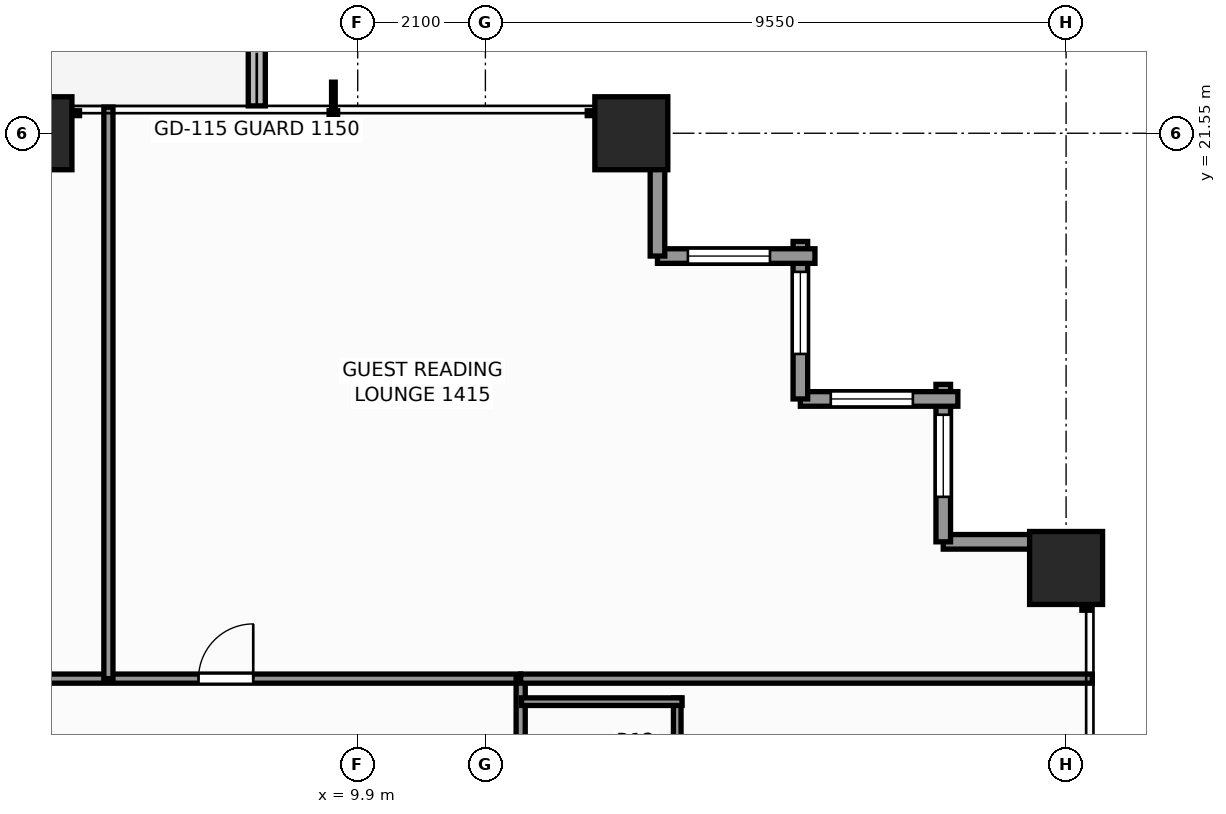
"""IFC4 building model, lengths in metres.
Left out: names, types, materials, properties, quantities, classifications, styles, units other than length and angle.
Written with IfcOpenShell. Run it as: python <this file> out.ifc"""

import sys

from ifc_helpers import new_model, si_unit, direction, frame, frame_2d, origin, origin_2d, place, context, subcontext, project, spatial, rectangle, extrude, element, fill, save


model = new_model("IFC4")
c1 = context("Model", 3, precision=1e-05, world=origin(), true_north=direction((0.0, 1.0)))
c2 = subcontext(c1, "Body", "Model", "MODEL_VIEW")
j1 = project(units=[si_unit("LENGTHUNIT", "METRE"), si_unit("PLANEANGLEUNIT", "RADIAN")], contexts=[c1])
p1 = place(None, origin())
s1 = spatial("IfcSite", under=j1, at=p1, CompositionType="ELEMENT")
p2 = place(p1, origin())
s2 = spatial("IfcBuilding", under=s1, at=p2, CompositionType="ELEMENT")
p3 = place(p2, frame((0.0, 0.0, 50.2)))
s3 = spatial("IfcBuildingStorey", under=s2, at=p3, CompositionType="ELEMENT", Elevation=50.2)
for number, where, z_axis, x_axis in (
    (1, (4.6, 21.55, 0.0), (0.0, 0.0, 1.0), (1.0, 0.0, 0.0)),
    (2, (14.4, 21.55, 0.0), (0.0, 0.0, 1.0), (1.0, 0.0, 0.0)),
    (3, (21.55, 14.4, 0.0), (0.0, 0.0, 1.0), (1.0, 0.0, 0.0)),
):
    element("IfcColumn", number, at=place(p3, frame(where, z_axis=z_axis, x_axis=x_axis)), inside=s3, PredefinedType="COLUMN", context=c2, shape_type="SweptSolid", body=[
        extrude(rectangle(XDim=1.2, YDim=1.2, at=origin_2d()), origin(), (0.0, 0.0, 1.0), 3.3),
    ])
p4 = place(p3, frame((8.24, 22.0, -0.06), z_axis=(0.0, 0.0, 1.0), x_axis=(0.0, 1.0, 0.0)))
e4 = element("IfcWall", 4, at=p4, inside=s3, PredefinedType="PARAPET", context=c2, shape_type="SweptSolid", body=[
    extrude(rectangle(XDim=1.705, YDim=0.28, at=frame_2d((0.853, 0.0))), origin(), (0.0, 0.0, 1.0), 0.42),
])
p5 = place(p3, frame((19.53, 14.83, 0.0), z_axis=(0.0, 0.0, 1.0), x_axis=(1.0, 0.0, 0.0)))
e5 = element("IfcWall", 5, at=p5, inside=s3, PredefinedType="STANDARD", context=c2, shape_type="SweptSolid", body=[
    extrude(rectangle(XDim=2.59, YDim=0.24, at=frame_2d((1.295, 0.0))), origin(), (0.0, 0.0, 1.0), 2.439),
])
p6 = place(p3, frame((19.53, 17.42, 0.0), z_axis=(0.0, 0.0, 1.0), x_axis=(0.0, -1.0, 0.0)))
e6 = element("IfcWall", 6, at=p6, inside=s3, PredefinedType="STANDARD", context=c2, shape_type="SweptSolid", body=[
    extrude(rectangle(XDim=2.59, YDim=0.24, at=frame_2d((1.295, 0.0))), origin(), (0.0, 0.0, 1.0), 2.439),
])
p7 = place(p6, frame((0.5, 0.0, 0.65)))
e7 = element("IfcOpeningElement", 7, at=p7, cuts=e6, PredefinedType="OPENING", context=c2, shape_type="SweptSolid", body=[
    extrude(rectangle(XDim=1.35, YDim=1.55, at=frame_2d((0.675, 0.775))), frame((0.0, 0.13, 0.0), z_axis=(0.0, -1.0, 0.0), x_axis=(1.0, 0.0, 0.0)), (0.0, 0.0, 1.0), 0.26),
])
p8 = place(p3, frame((17.18, 17.18, 0.0), z_axis=(0.0, 0.0, 1.0), x_axis=(1.0, 0.0, 0.0)))
e8 = element("IfcWall", 8, at=p8, inside=s3, PredefinedType="STANDARD", context=c2, shape_type="SweptSolid", body=[
    extrude(rectangle(XDim=2.59, YDim=0.24, at=frame_2d((1.295, 0.0))), origin(), (0.0, 0.0, 1.0), 2.439),
])
p9 = place(p8, frame((0.5, 0.0, 0.65)))
e9 = element("IfcOpeningElement", 9, at=p9, cuts=e8, PredefinedType="OPENING", context=c2, shape_type="SweptSolid", body=[
    extrude(rectangle(XDim=1.35, YDim=1.55, at=frame_2d((0.675, 0.775))), frame((0.0, 0.13, 0.0), z_axis=(0.0, -1.0, 0.0), x_axis=(1.0, 0.0, 0.0)), (0.0, 0.0, 1.0), 0.26),
])
p10 = place(p3, frame((17.18, 19.77, 0.0), z_axis=(0.0, 0.0, 1.0), x_axis=(0.0, -1.0, 0.0)))
e10 = element("IfcWall", 10, at=p10, inside=s3, PredefinedType="STANDARD", context=c2, shape_type="SweptSolid", body=[
    extrude(rectangle(XDim=2.59, YDim=0.24, at=frame_2d((1.295, 0.0))), origin(), (0.0, 0.0, 1.0), 2.439),
])
p11 = place(p10, frame((0.5, 0.0, 0.65)))
e11 = element("IfcOpeningElement", 11, at=p11, cuts=e10, PredefinedType="OPENING", context=c2, shape_type="SweptSolid", body=[
    extrude(rectangle(XDim=1.35, YDim=1.55, at=frame_2d((0.675, 0.775))), frame((0.0, 0.13, 0.0), z_axis=(0.0, -1.0, 0.0), x_axis=(1.0, 0.0, 0.0)), (0.0, 0.0, 1.0), 0.26),
])
p12 = place(p3, frame((14.83, 19.53, 0.0), z_axis=(0.0, 0.0, 1.0), x_axis=(1.0, 0.0, 0.0)))
e12 = element("IfcWall", 12, at=p12, inside=s3, PredefinedType="STANDARD", context=c2, shape_type="SweptSolid", body=[
    extrude(rectangle(XDim=2.59, YDim=0.24, at=frame_2d((1.295, 0.0))), origin(), (0.0, 0.0, 1.0), 2.439),
])
p13 = place(p12, frame((0.5, 0.0, 0.65)))
e13 = element("IfcOpeningElement", 13, at=p13, cuts=e12, PredefinedType="OPENING", context=c2, shape_type="SweptSolid", body=[
    extrude(rectangle(XDim=1.35, YDim=1.55, at=frame_2d((0.675, 0.775))), frame((0.0, 0.13, 0.0), z_axis=(0.0, -1.0, 0.0), x_axis=(1.0, 0.0, 0.0)), (0.0, 0.0, 1.0), 0.26),
])
p14 = place(p3, frame((14.83, 22.12, 0.0), z_axis=(0.0, 0.0, 1.0), x_axis=(0.0, -1.0, 0.0)))
e14 = element("IfcWall", 14, at=p14, inside=s3, PredefinedType="STANDARD", context=c2, shape_type="SweptSolid", body=[
    extrude(rectangle(XDim=2.59, YDim=0.24, at=frame_2d((1.295, 0.0))), origin(), (0.0, 0.0, 1.0), 2.439),
])
p15 = place(p3, frame((-12.26, 12.58, 0.0), z_axis=(0.0, 0.0, 1.0), x_axis=(1.0, 0.0, 0.0)))
e15 = element("IfcWall", 15, at=p15, inside=s3, PredefinedType="PARTITIONING", context=c2, shape_type="SweptSolid", body=[
    extrude(rectangle(XDim=24.84, YDim=0.15, at=frame_2d((12.42, 0.0))), origin(), (0.0, 0.0, 1.0), 2.272),
])
p16 = place(p15, frame((3.462, 0.0, 0.0)))
e16 = element("IfcOpeningElement", 16, at=p16, cuts=e15, PredefinedType="OPENING", context=c2, shape_type="SweptSolid", body=[
    extrude(rectangle(XDim=0.9, YDim=2.06, at=frame_2d((0.45, 1.03))), frame((0.0, 0.085, 0.0), z_axis=(0.0, -1.0, 0.0), x_axis=(1.0, 0.0, 0.0)), (0.0, 0.0, 1.0), 0.17),
])
p17 = place(p15, frame((8.723, 0.0, 0.0)))
e17 = element("IfcOpeningElement", 17, at=p17, cuts=e15, PredefinedType="OPENING", context=c2, shape_type="SweptSolid", body=[
    extrude(rectangle(XDim=0.95, YDim=2.06, at=frame_2d((0.475, 1.03))), frame((0.0, 0.085, 0.0), z_axis=(0.0, -1.0, 0.0), x_axis=(1.0, 0.0, 0.0)), (0.0, 0.0, 1.0), 0.17),
])
p18 = place(p15, frame((14.157, 0.0, 0.0)))
e18 = element("IfcOpeningElement", 18, at=p18, cuts=e15, PredefinedType="OPENING", context=c2, shape_type="SweptSolid", body=[
    extrude(rectangle(XDim=0.95, YDim=2.06, at=frame_2d((0.475, 1.03))), frame((0.0, 0.085, 0.0), z_axis=(0.0, -1.0, 0.0), x_axis=(1.0, 0.0, 0.0)), (0.0, 0.0, 1.0), 0.17),
])
p19 = place(p15, frame((19.542, 0.0, 0.0)))
e19 = element("IfcOpeningElement", 19, at=p19, cuts=e15, PredefinedType="OPENING", context=c2, shape_type="SweptSolid", body=[
    extrude(rectangle(XDim=0.9, YDim=2.06, at=frame_2d((0.45, 1.03))), frame((0.0, 0.085, 0.0), z_axis=(0.0, -1.0, 0.0), x_axis=(1.0, 0.0, 0.0)), (0.0, 0.0, 1.0), 0.17),
])
p20 = place(p3, frame((12.58, -12.26, 0.0), z_axis=(0.0, 0.0, 1.0), x_axis=(0.0, 1.0, 0.0)))
e20 = element("IfcWall", 20, at=p20, inside=s3, PredefinedType="PARTITIONING", context=c2, shape_type="SweptSolid", body=[
    extrude(rectangle(XDim=24.84, YDim=0.15, at=frame_2d((12.42, 0.0))), origin(), (0.0, 0.0, 1.0), 2.272),
])
p21 = place(p20, frame((2.686, 0.0, 0.0)))
e21 = element("IfcOpeningElement", 21, at=p21, cuts=e20, PredefinedType="OPENING", context=c2, shape_type="SweptSolid", body=[
    extrude(rectangle(XDim=0.9, YDim=2.06, at=frame_2d((0.45, 1.03))), frame((0.0, 0.085, 0.0), z_axis=(0.0, -1.0, 0.0), x_axis=(1.0, 0.0, 0.0)), (0.0, 0.0, 1.0), 0.17),
])
p22 = place(p20, frame((5.021, 0.0, 0.0)))
e22 = element("IfcOpeningElement", 22, at=p22, cuts=e20, PredefinedType="OPENING", context=c2, shape_type="SweptSolid", body=[
    extrude(rectangle(XDim=0.9, YDim=2.06, at=frame_2d((0.45, 1.03))), frame((0.0, 0.085, 0.0), z_axis=(0.0, -1.0, 0.0), x_axis=(1.0, 0.0, 0.0)), (0.0, 0.0, 1.0), 0.17),
])
p23 = place(p20, frame((14.294, 0.0, 0.0)))
e23 = element("IfcOpeningElement", 23, at=p23, cuts=e20, PredefinedType="OPENING", context=c2, shape_type="SweptSolid", body=[
    extrude(rectangle(XDim=0.95, YDim=2.06, at=frame_2d((0.475, 1.03))), frame((0.0, 0.085, 0.0), z_axis=(0.0, -1.0, 0.0), x_axis=(1.0, 0.0, 0.0)), (0.0, 0.0, 1.0), 0.17),
])
p24 = place(p20, frame((19.407, 0.0, 0.0)))
e24 = element("IfcOpeningElement", 24, at=p24, cuts=e20, PredefinedType="OPENING", context=c2, shape_type="SweptSolid", body=[
    extrude(rectangle(XDim=0.95, YDim=2.06, at=frame_2d((0.475, 1.03))), frame((0.0, 0.085, 0.0), z_axis=(0.0, -1.0, 0.0), x_axis=(1.0, 0.0, 0.0)), (0.0, 0.0, 1.0), 0.17),
])
p25 = place(p3, frame((12.58, 12.58, 0.0), z_axis=(0.0, 0.0, 1.0), x_axis=(1.0, 0.0, 0.0)))
e25 = element("IfcWall", 25, at=p25, inside=s3, PredefinedType="PARTITIONING", context=c2, shape_type="SweptSolid", body=[
    extrude(rectangle(XDim=9.4, YDim=0.15, at=frame_2d((4.7, 0.0))), origin(), (0.0, 0.0, 1.0), 2.272),
])
p26 = place(p3, frame((15.155, 9.741, 0.0), z_axis=(0.0, 0.0, 1.0), x_axis=(0.0, 1.0, 0.0)))
e26 = element("IfcWall", 26, at=p26, inside=s3, PredefinedType="PARTITIONING", context=c2, shape_type="SweptSolid", body=[
    extrude(rectangle(XDim=2.52, YDim=0.125, at=frame_2d((1.26, 0.0))), origin(), (0.0, 0.0, 1.0), 2.272),
])
p27 = place(p3, frame((12.595, 12.201, 0.0), z_axis=(0.0, 0.0, 1.0), x_axis=(1.0, 0.0, 0.0)))
e27 = element("IfcWall", 27, at=p27, inside=s3, PredefinedType="PARTITIONING", context=c2, shape_type="SweptSolid", body=[
    extrude(rectangle(XDim=2.64, YDim=0.125, at=frame_2d((1.32, 0.0))), origin(), (0.0, 0.0, 1.0), 2.272),
])
p28 = place(p3, frame((5.8, 12.58, 0.0), z_axis=(0.0, 0.0, 1.0), x_axis=(0.0, 1.0, 0.0)))
e28 = element("IfcWall", 28, at=p28, inside=s3, PredefinedType="PARTITIONING", context=c2, shape_type="SweptSolid", body=[
    extrude(rectangle(XDim=9.4, YDim=0.15, at=frame_2d((4.7, 0.0))), origin(), (0.0, 0.0, 1.0), 2.429),
])
p29 = place(p7, origin())
e29 = element("IfcWindow", 29, at=p29, inside=s3, PartitioningType="SINGLE_PANEL", PredefinedType="WINDOW", context=c2, shape_type="SweptSolid", body=[
    extrude(rectangle(XDim=1.35, YDim=1.55, at=frame_2d((0.675, 0.775))), frame((0.0, 0.03, 0.0), z_axis=(0.0, -1.0, 0.0), x_axis=(1.0, 0.0, 0.0)), (0.0, 0.0, 1.0), 0.06),
])
fill(e7, e29)
p30 = place(p9, origin())
e30 = element("IfcWindow", 30, at=p30, inside=s3, PartitioningType="SINGLE_PANEL", PredefinedType="WINDOW", context=c2, shape_type="SweptSolid", body=[
    extrude(rectangle(XDim=1.35, YDim=1.55, at=frame_2d((0.675, 0.775))), frame((0.0, 0.03, 0.0), z_axis=(0.0, -1.0, 0.0), x_axis=(1.0, 0.0, 0.0)), (0.0, 0.0, 1.0), 0.06),
])
fill(e9, e30)
p31 = place(p11, origin())
e31 = element("IfcWindow", 31, at=p31, inside=s3, PartitioningType="SINGLE_PANEL", PredefinedType="WINDOW", context=c2, shape_type="SweptSolid", body=[
    extrude(rectangle(XDim=1.35, YDim=1.55, at=frame_2d((0.675, 0.775))), frame((0.0, 0.03, 0.0), z_axis=(0.0, -1.0, 0.0), x_axis=(1.0, 0.0, 0.0)), (0.0, 0.0, 1.0), 0.06),
])
fill(e11, e31)
p32 = place(p13, origin())
e32 = element("IfcWindow", 32, at=p32, inside=s3, PartitioningType="SINGLE_PANEL", PredefinedType="WINDOW", context=c2, shape_type="SweptSolid", body=[
    extrude(rectangle(XDim=1.35, YDim=1.55, at=frame_2d((0.675, 0.775))), frame((0.0, 0.03, 0.0), z_axis=(0.0, -1.0, 0.0), x_axis=(1.0, 0.0, 0.0)), (0.0, 0.0, 1.0), 0.06),
])
fill(e13, e32)
p33 = place(p19, origin())
e33 = element("IfcDoor", 33, at=p33, inside=s3, OperationType="SINGLE_SWING_RIGHT", PredefinedType="DOOR", context=c2, shape_type="SweptSolid", body=[
    extrude(rectangle(XDim=0.9, YDim=2.06, at=frame_2d((0.45, 1.03))), frame((0.0, 0.025, 0.0), z_axis=(0.0, -1.0, 0.0), x_axis=(1.0, 0.0, 0.0)), (0.0, 0.0, 1.0), 0.05),
])
fill(e19, e33)
save(model, sys.argv[1])
